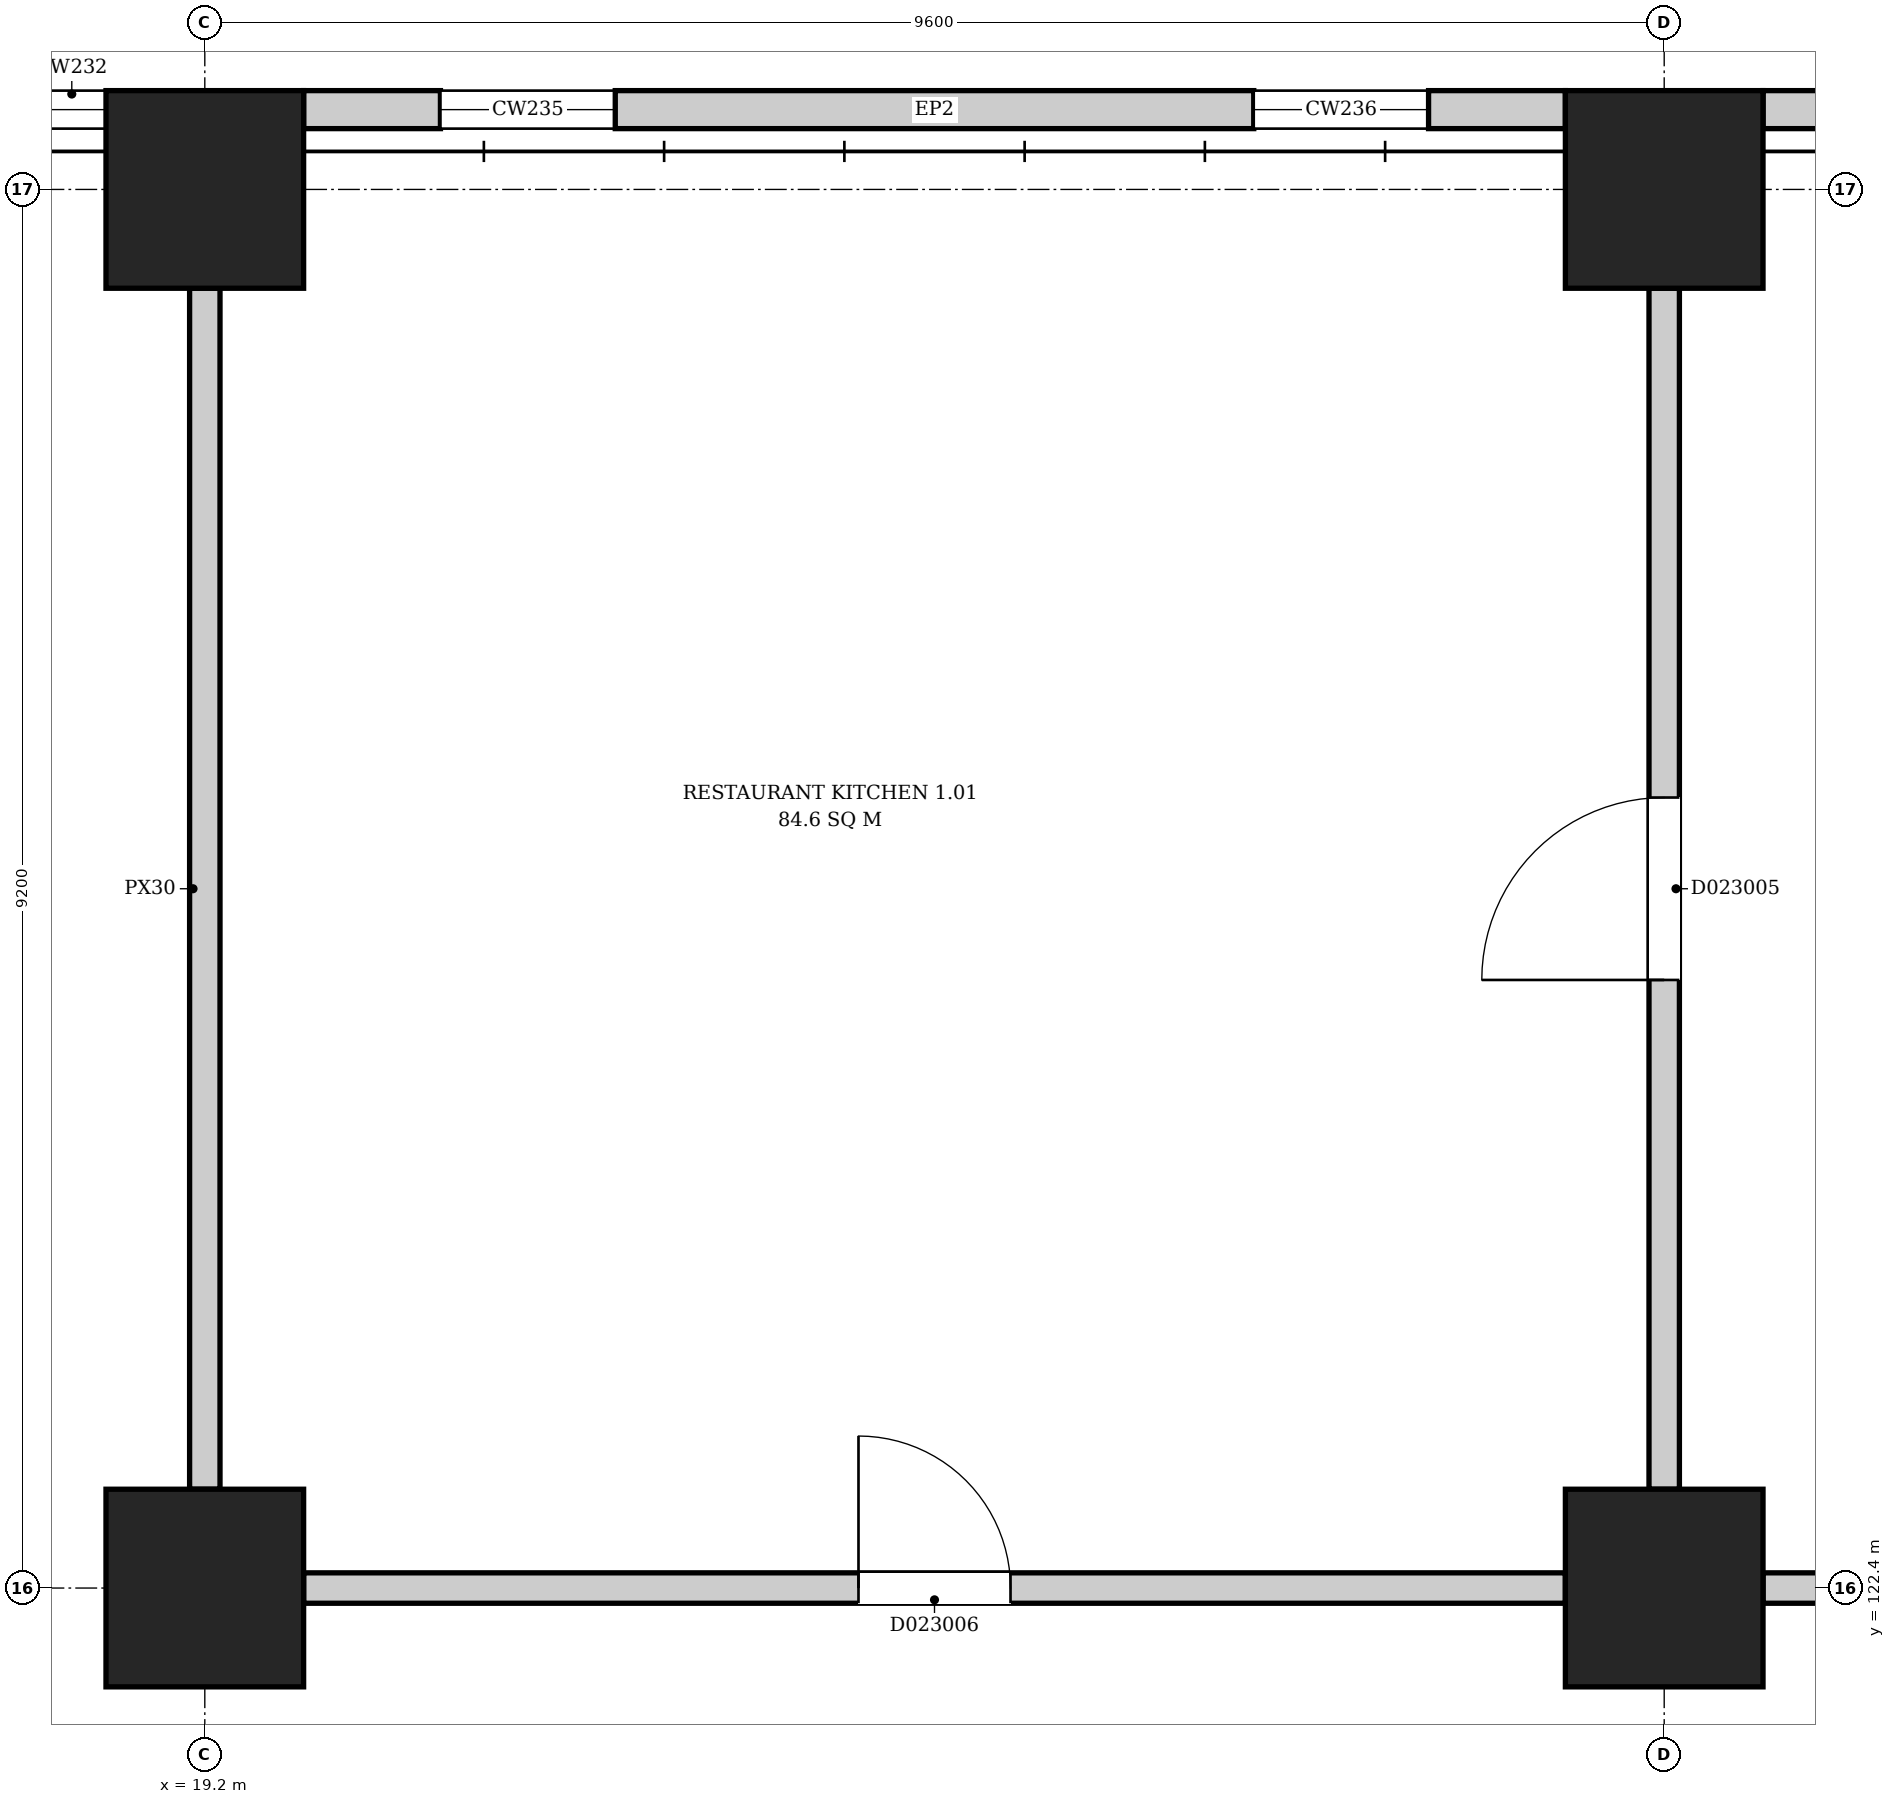
"""IFC4 building model, lengths in metres.
Left out: names, types, materials, properties, quantities, classifications, styles, units other than length and angle.
Written with IfcOpenShell. Run it as: python <this file> out.ifc"""

import sys

from ifc_helpers import new_model, si_unit, direction, frame, frame_2d, origin, origin_2d, place, context, subcontext, project, spatial, rectangle, extrude, element, fill, save


model = new_model("IFC4")
c1 = context("Model", 3, precision=1e-05, world=origin(), true_north=direction((0.0, 1.0)))
c2 = subcontext(c1, "Body", "Model", "MODEL_VIEW")
j1 = project(units=[si_unit("LENGTHUNIT", "METRE"), si_unit("PLANEANGLEUNIT", "RADIAN")], contexts=[c1])
p1 = place(None, origin())
s1 = spatial("IfcSite", under=j1, at=p1, CompositionType="ELEMENT")
p2 = place(p1, origin())
s2 = spatial("IfcBuilding", under=s1, at=p2, CompositionType="ELEMENT")
p3 = place(p2, frame((0.0, 0.0, 6.5)))
s3 = spatial("IfcBuildingStorey", under=s2, at=p3, CompositionType="ELEMENT", Elevation=6.5)
for number, where, z_axis, x_axis in (
    (1, (19.2, 122.4, 0.0), (0.0, 0.0, 1.0), (1.0, 0.0, 0.0)),
    (2, (28.8, 122.4, 0.0), (0.0, 0.0, 1.0), (1.0, 0.0, 0.0)),
    (3, (19.2, 131.6, 0.0), (0.0, 0.0, 1.0), (1.0, 0.0, 0.0)),
    (4, (28.8, 131.6, 0.0), (0.0, 0.0, 1.0), (1.0, 0.0, 0.0)),
):
    element("IfcColumn", number, at=place(p3, frame(where, z_axis=z_axis, x_axis=x_axis)), inside=s3, PredefinedType="COLUMN", context=c2, shape_type="SweptSolid", body=[
        extrude(rectangle(XDim=1.3, YDim=1.3, at=origin_2d()), origin(), (0.0, 0.0, 1.0), 7.7),
    ])
p4 = place(p3, frame((20.75, 132.125, 0.0), z_axis=(0.0, 0.0, 1.0), x_axis=(-1.0, 0.0, 0.0)))
e5 = element("IfcWall", 5, at=p4, inside=s3, PredefinedType="ELEMENTEDWALL", context=c2, shape_type="SweptSolid", body=[
    extrude(rectangle(XDim=0.9, YDim=0.25, at=frame_2d((0.45, 0.0))), origin(), (0.0, 0.0, 1.0), 7.29),
])
p5 = place(p3, frame((26.1, 132.125, 0.0), z_axis=(0.0, 0.0, 1.0), x_axis=(-1.0, 0.0, 0.0)))
e6 = element("IfcWall", 6, at=p5, inside=s3, PredefinedType="ELEMENTEDWALL", context=c2, shape_type="SweptSolid", body=[
    extrude(rectangle(XDim=4.2, YDim=0.25, at=frame_2d((2.1, 0.0))), origin(), (0.0, 0.0, 1.0), 7.29),
])
p6 = place(p3, frame((28.15, 132.125, 0.0), z_axis=(0.0, 0.0, 1.0), x_axis=(-1.0, 0.0, 0.0)))
e7 = element("IfcWall", 7, at=p6, inside=s3, PredefinedType="ELEMENTEDWALL", context=c2, shape_type="SweptSolid", body=[
    extrude(rectangle(XDim=0.9, YDim=0.25, at=frame_2d((0.45, 0.0))), origin(), (0.0, 0.0, 1.0), 7.29),
])
p7 = place(p3, frame((30.35, 132.125, 0.0), z_axis=(0.0, 0.0, 1.0), x_axis=(-1.0, 0.0, 0.0)))
e8 = element("IfcWall", 8, at=p7, inside=s3, PredefinedType="ELEMENTEDWALL", context=c2, shape_type="SweptSolid", body=[
    extrude(rectangle(XDim=0.9, YDim=0.25, at=frame_2d((0.45, 0.0))), origin(), (0.0, 0.0, 1.0), 7.29),
])
p8 = place(p3, frame((19.2, 123.05, 0.0), z_axis=(0.0, 0.0, 1.0), x_axis=(0.0, 1.0, 0.0)))
e9 = element("IfcWall", 9, at=p8, inside=s3, PredefinedType="PARTITIONING", context=c2, shape_type="SweptSolid", body=[
    extrude(rectangle(XDim=7.9, YDim=0.2, at=frame_2d((3.95, 0.0))), origin(), (0.0, 0.0, 1.0), 6.89),
])
p9 = place(p3, frame((19.85, 122.4, 0.0), z_axis=(0.0, 0.0, 1.0), x_axis=(1.0, 0.0, 0.0)))
e10 = element("IfcWall", 10, at=p9, inside=s3, PredefinedType="PARTITIONING", context=c2, shape_type="SweptSolid", body=[
    extrude(rectangle(XDim=8.3, YDim=0.2, at=frame_2d((4.15, 0.0))), origin(), (0.0, 0.0, 1.0), 6.29),
])
p10 = place(p9, frame((3.65, 0.0, 0.0)))
e11 = element("IfcOpeningElement", 11, at=p10, cuts=e10, PredefinedType="OPENING", context=c2, shape_type="SweptSolid", body=[
    extrude(rectangle(XDim=1.0, YDim=2.1, at=frame_2d((0.5, 1.05))), frame((0.0, 0.11, 0.0), z_axis=(0.0, -1.0, 0.0), x_axis=(1.0, 0.0, 0.0)), (0.0, 0.0, 1.0), 0.22),
])
p11 = place(p3, frame((28.8, 123.05, 0.0), z_axis=(0.0, 0.0, 1.0), x_axis=(0.0, 1.0, 0.0)))
e12 = element("IfcWall", 12, at=p11, inside=s3, PredefinedType="PARTITIONING", context=c2, shape_type="SweptSolid", body=[
    extrude(rectangle(XDim=7.9, YDim=0.2, at=frame_2d((3.95, 0.0))), origin(), (0.0, 0.0, 1.0), 6.89),
])
p12 = place(p11, frame((3.35, 0.0, 0.0)))
e13 = element("IfcOpeningElement", 13, at=p12, cuts=e12, PredefinedType="OPENING", context=c2, shape_type="SweptSolid", body=[
    extrude(rectangle(XDim=1.2, YDim=2.1, at=frame_2d((0.6, 1.05))), frame((0.0, 0.11, 0.0), z_axis=(0.0, -1.0, 0.0), x_axis=(1.0, 0.0, 0.0)), (0.0, 0.0, 1.0), 0.22),
])
p13 = place(p3, frame((29.45, 122.4, 0.0), z_axis=(0.0, 0.0, 1.0), x_axis=(1.0, 0.0, 0.0)))
e14 = element("IfcWall", 14, at=p13, inside=s3, PredefinedType="PARTITIONING", context=c2, shape_type="SweptSolid", body=[
    extrude(rectangle(XDim=8.3, YDim=0.2, at=frame_2d((4.15, 0.0))), origin(), (0.0, 0.0, 1.0), 6.29),
])
p14 = place(p12, origin())
e15 = element("IfcDoor", 15, at=p14, inside=s3, OperationType="SINGLE_SWING_LEFT", PredefinedType="DOOR", context=c2, shape_type="SweptSolid", body=[
    extrude(rectangle(XDim=1.2, YDim=2.1, at=frame_2d((0.6, 1.05))), frame((0.0, 0.025, 0.0), z_axis=(0.0, -1.0, 0.0), x_axis=(1.0, 0.0, 0.0)), (0.0, 0.0, 1.0), 0.05),
])
fill(e13, e15)
p15 = place(p10, origin())
e16 = element("IfcDoor", 16, at=p15, inside=s3, OperationType="SINGLE_SWING_LEFT", PredefinedType="DOOR", context=c2, shape_type="SweptSolid", body=[
    extrude(rectangle(XDim=1.0, YDim=2.1, at=frame_2d((0.5, 1.05))), frame((0.0, 0.025, 0.0), z_axis=(0.0, -1.0, 0.0), x_axis=(1.0, 0.0, 0.0)), (0.0, 0.0, 1.0), 0.05),
])
fill(e11, e16)
save(model, sys.argv[1])
